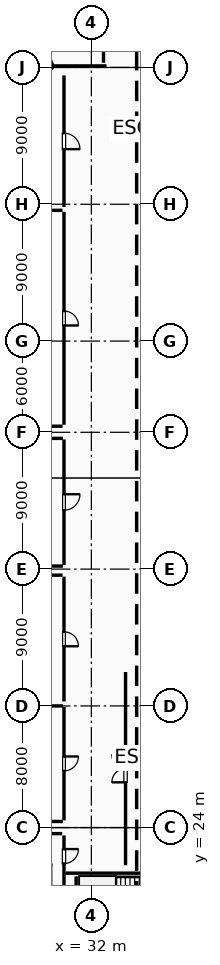
"""IFC4 building model, lengths in metres.
Left out: names, types, materials, properties, quantities, classifications, styles, units other than length and angle.
Written with IfcOpenShell. Run it as: python <this file> out.ifc"""

import sys

from ifc_helpers import new_model, si_unit, direction, frame, frame_2d, origin, origin_2d, place, context, subcontext, project, spatial, rectangle, extrude, element, fill, save


model = new_model("IFC4")
c1 = context("Model", 3, precision=1e-05, world=origin(), true_north=direction((0.0, 1.0)))
c2 = subcontext(c1, "Body", "Model", "MODEL_VIEW")
j1 = project(units=[si_unit("LENGTHUNIT", "METRE"), si_unit("PLANEANGLEUNIT", "RADIAN")], contexts=[c1])
p1 = place(None, origin())
s1 = spatial("IfcSite", under=j1, at=p1, CompositionType="ELEMENT")
p2 = place(p1, origin())
s2 = spatial("IfcBuilding", under=s1, at=p2, CompositionType="ELEMENT")
p3 = place(p2, origin())
s3 = spatial("IfcBuildingStorey", under=s2, at=p3, CompositionType="ELEMENT", Elevation=0.0)
for number, where, z_axis, x_axis in (
    (1, (32.0, 24.0, 0.0), (0.0, 0.0, 1.0), (1.0, 0.0, 0.0)),
    (2, (32.0, 50.0, 0.0), (0.0, 0.0, 1.0), (1.0, 0.0, 0.0)),
    (3, (32.0, 56.0, 0.0), (0.0, 0.0, 1.0), (1.0, 0.0, 0.0)),
    (4, (32.0, 65.0, 0.0), (0.0, 0.0, 1.0), (1.0, 0.0, 0.0)),
):
    element("IfcColumn", number, at=place(p3, frame(where, z_axis=z_axis, x_axis=x_axis)), inside=s3, PredefinedType="COLUMN", context=c2, shape_type="SweptSolid", body=[
        extrude(rectangle(XDim=0.75, YDim=0.75, at=origin_2d()), origin(), (0.0, 0.0, 1.0), 5.4),
    ])
p4 = place(p3, frame((39.2, 21.0, 0.0), z_axis=(0.0, 0.0, 1.0), x_axis=(-1.0, 0.0, 0.0)))
e5 = element("IfcWall", 5, at=p4, inside=s3, PredefinedType="SHEAR", context=c2, shape_type="SweptSolid", body=[
    extrude(rectangle(XDim=8.896, YDim=0.4, at=frame_2d((4.448, 0.0))), origin(), (0.0, 0.0, 1.0), 5.12),
])
p5 = place(p3, frame((31.0, 20.79, 0.0), z_axis=(0.0, 0.0, 1.0), x_axis=(0.0, -1.0, 0.0)))
e6 = element("IfcWall", 6, at=p5, inside=s3, PredefinedType="SHEAR", context=c2, shape_type="SweptSolid", body=[
    extrude(rectangle(XDim=8.38, YDim=0.4, at=frame_2d((4.19, 0.0))), origin(), (0.0, 0.0, 1.0), 5.12),
])
p6 = place(p3, frame((29.45, 21.525, 0.0), z_axis=(0.0, 0.0, 1.0), x_axis=(-1.0, 0.0, 0.0)))
e7 = element("IfcWall", 7, at=p6, inside=s3, PredefinedType="STANDARD", context=c2, shape_type="SweptSolid", body=[
    extrude(rectangle(XDim=3.7, YDim=0.25, at=frame_2d((1.85, 0.0))), origin(), (0.0, 0.0, 1.0), 5.11),
])
p7 = place(p3, frame((29.325, 17.01, 0.0), z_axis=(0.0, 0.0, 1.0), x_axis=(0.0, 1.0, 0.0)))
e8 = element("IfcWall", 8, at=p7, inside=s3, PredefinedType="STANDARD", context=c2, shape_type="SweptSolid", body=[
    extrude(rectangle(XDim=4.38, YDim=0.25, at=frame_2d((2.19, 0.0))), origin(), (0.0, 0.0, 1.0), 5.11),
])
p8 = place(p3, frame((24.374, 74.1, 0.0), z_axis=(0.0, 0.0, 1.0), x_axis=(1.0, 0.0, 0.0)))
e9 = element("IfcWall", 9, at=p8, inside=s3, PredefinedType="SHEAR", context=c2, shape_type="SweptSolid", body=[
    extrude(rectangle(XDim=8.626, YDim=0.4, at=frame_2d((4.313, 0.0))), origin(), (0.0, 0.0, 1.0), 5.12),
])
p9 = place(p8, frame((3.776, 0.0, 0.0)))
e10 = element("IfcOpeningElement", 10, at=p9, cuts=e9, PredefinedType="OPENING", context=c2, shape_type="SweptSolid", body=[
    extrude(rectangle(XDim=1.3, YDim=2.15, at=frame_2d((0.65, 1.075))), frame((0.0, 0.21, 0.0), z_axis=(0.0, -1.0, 0.0), x_axis=(1.0, 0.0, 0.0)), (0.0, 0.0, 1.0), 0.42),
])
p10 = place(p3, frame((32.8, 74.31, 0.0), z_axis=(0.0, 0.0, 1.0), x_axis=(0.0, 1.0, 0.0)))
e11 = element("IfcWall", 11, at=p10, inside=s3, PredefinedType="SHEAR", context=c2, shape_type="SweptSolid", body=[
    extrude(rectangle(XDim=8.38, YDim=0.4, at=frame_2d((4.19, 0.0))), origin(), (0.0, 0.0, 1.0), 5.12),
])
p11 = place(p3, frame((24.39, 64.6, 0.0), z_axis=(0.0, 0.0, 1.0), x_axis=(1.0, 0.0, 0.0)))
e12 = element("IfcWall", 12, at=p11, inside=s3, PredefinedType="PARTITIONING", context=c2, shape_type="SweptSolid", body=[
    extrude(rectangle(XDim=5.715, YDim=0.15, at=frame_2d((2.857, 0.0))), origin(), (0.0, 0.0, 1.0), 4.35),
])
p12 = place(p3, frame((30.2, 64.505, 0.0), z_axis=(0.0, 0.0, 1.0), x_axis=(0.0, -1.0, 0.0)))
e13 = element("IfcWall", 13, at=p12, inside=s3, PredefinedType="PARTITIONING", context=c2, shape_type="SweptSolid", body=[
    extrude(rectangle(XDim=14.01, YDim=0.15, at=frame_2d((7.005, 0.0))), origin(), (0.0, 0.0, 1.0), 5.11),
])
p13 = place(p12, frame((6.53, 0.0, 0.0)))
e14 = element("IfcOpeningElement", 14, at=p13, cuts=e13, PredefinedType="OPENING", context=c2, shape_type="SweptSolid", body=[
    extrude(rectangle(XDim=0.95, YDim=2.15, at=frame_2d((0.475, 1.075))), frame((0.0, 0.085, 0.0), z_axis=(0.0, -1.0, 0.0), x_axis=(1.0, 0.0, 0.0)), (0.0, 0.0, 1.0), 0.17),
])
p14 = place(p3, frame((30.105, 50.4, 0.0), z_axis=(0.0, 0.0, 1.0), x_axis=(-1.0, 0.0, 0.0)))
e15 = element("IfcWall", 15, at=p14, inside=s3, PredefinedType="PARTITIONING", context=c2, shape_type="SweptSolid", body=[
    extrude(rectangle(XDim=5.715, YDim=0.15, at=frame_2d((2.857, 0.0))), origin(), (0.0, 0.0, 1.0), 4.1),
])
p15 = place(p3, frame((24.39, 23.6, 0.0), z_axis=(0.0, 0.0, 1.0), x_axis=(1.0, 0.0, 0.0)))
e16 = element("IfcWall", 16, at=p15, inside=s3, PredefinedType="PARTITIONING", context=c2, shape_type="SweptSolid", body=[
    extrude(rectangle(XDim=5.69, YDim=0.2, at=frame_2d((2.845, 0.0))), origin(), (0.0, 0.0, 1.0), 5.11),
])
p16 = place(p3, frame((30.2, 23.48, 0.0), z_axis=(0.0, 0.0, 1.0), x_axis=(0.0, -1.0, 0.0)))
e17 = element("IfcWall", 17, at=p16, inside=s3, PredefinedType="PARTITIONING", context=c2, shape_type="SweptSolid", body=[
    extrude(rectangle(XDim=7.36, YDim=0.2, at=frame_2d((3.68, 0.0))), origin(), (0.0, 0.0, 1.0), 5.11),
])
p17 = place(p16, frame((0.897, 0.0, 0.0)))
e18 = element("IfcOpeningElement", 18, at=p17, cuts=e17, PredefinedType="OPENING", context=c2, shape_type="SweptSolid", body=[
    extrude(rectangle(XDim=0.95, YDim=2.15, at=frame_2d((0.475, 1.075))), frame((0.0, 0.11, 0.0), z_axis=(0.0, -1.0, 0.0), x_axis=(1.0, 0.0, 0.0)), (0.0, 0.0, 1.0), 0.22),
])
p18 = place(p3, frame((30.2, 73.48, 0.0), z_axis=(0.0, 0.0, 1.0), x_axis=(0.0, -1.0, 0.0)))
e19 = element("IfcWall", 19, at=p18, inside=s3, PredefinedType="PARTITIONING", context=c2, shape_type="SweptSolid", body=[
    extrude(rectangle(XDim=8.66, YDim=0.2, at=frame_2d((4.33, 0.0))), origin(), (0.0, 0.0, 1.0), 5.11),
])
p19 = place(p18, frame((3.805, 0.0, 0.0)))
e20 = element("IfcOpeningElement", 20, at=p19, cuts=e19, PredefinedType="OPENING", context=c2, shape_type="SweptSolid", body=[
    extrude(rectangle(XDim=1.05, YDim=2.15, at=frame_2d((0.525, 1.075))), frame((0.0, 0.11, 0.0), z_axis=(0.0, -1.0, 0.0), x_axis=(1.0, 0.0, 0.0)), (0.0, 0.0, 1.0), 0.22),
])
p20 = place(p3, frame((30.13, 24.4, 0.0), z_axis=(0.0, 0.0, 1.0), x_axis=(-1.0, 0.0, 0.0)))
e21 = element("IfcWall", 21, at=p20, inside=s3, PredefinedType="PARTITIONING", context=c2, shape_type="SweptSolid", body=[
    extrude(rectangle(XDim=5.74, YDim=0.1, at=frame_2d((2.87, 0.0))), origin(), (0.0, 0.0, 1.0), 5.11),
])
p21 = place(p3, frame((16.465, 32.0, 0.0), z_axis=(0.0, 0.0, 1.0), x_axis=(1.0, 0.0, 0.0)))
e22 = element("IfcWall", 22, at=p21, inside=s3, PredefinedType="PARTITIONING", context=c2, shape_type="SweptSolid", body=[
    extrude(rectangle(XDim=13.665, YDim=0.1, at=frame_2d((6.833, 0.0))), origin(), (0.0, 0.0, 1.0), 4.5),
])
p22 = place(p3, frame((30.2, 31.93, 0.0), z_axis=(0.0, 0.0, 1.0), x_axis=(0.0, -1.0, 0.0)))
e23 = element("IfcWall", 23, at=p22, inside=s3, PredefinedType="PARTITIONING", context=c2, shape_type="SweptSolid", body=[
    extrude(rectangle(XDim=7.46, YDim=0.1, at=frame_2d((3.73, 0.0))), origin(), (0.0, 0.0, 1.0), 5.11),
])
p23 = place(p22, frame((3.255, 0.0, 0.0)))
e24 = element("IfcOpeningElement", 24, at=p23, cuts=e23, PredefinedType="OPENING", context=c2, shape_type="SweptSolid", body=[
    extrude(rectangle(XDim=0.95, YDim=2.15, at=frame_2d((0.475, 1.075))), frame((0.0, 0.06, 0.0), z_axis=(0.0, -1.0, 0.0), x_axis=(1.0, 0.0, 0.0)), (0.0, 0.0, 1.0), 0.12),
])
p24 = place(p3, frame((16.465, 40.6, 0.0), z_axis=(0.0, 0.0, 1.0), x_axis=(1.0, 0.0, 0.0)))
e25 = element("IfcWall", 25, at=p24, inside=s3, PredefinedType="PARTITIONING", context=c2, shape_type="SweptSolid", body=[
    extrude(rectangle(XDim=13.64, YDim=0.15, at=frame_2d((6.82, 0.0))), origin(), (0.0, 0.0, 1.0), 5.11),
])
p25 = place(p3, frame((30.2, 40.505, 0.0), z_axis=(0.0, 0.0, 1.0), x_axis=(0.0, -1.0, 0.0)))
e26 = element("IfcWall", 26, at=p25, inside=s3, PredefinedType="PARTITIONING", context=c2, shape_type="SweptSolid", body=[
    extrude(rectangle(XDim=8.21, YDim=0.15, at=frame_2d((4.105, 0.0))), origin(), (0.0, 0.0, 1.0), 5.11),
])
p26 = place(p25, frame((3.63, 0.0, 0.0)))
e27 = element("IfcOpeningElement", 27, at=p26, cuts=e26, PredefinedType="OPENING", context=c2, shape_type="SweptSolid", body=[
    extrude(rectangle(XDim=0.95, YDim=2.15, at=frame_2d((0.475, 1.075))), frame((0.0, 0.085, 0.0), z_axis=(0.0, -1.0, 0.0), x_axis=(1.0, 0.0, 0.0)), (0.0, 0.0, 1.0), 0.17),
])
p27 = place(p3, frame((24.39, 49.6, 0.0), z_axis=(0.0, 0.0, 1.0), x_axis=(1.0, 0.0, 0.0)))
e28 = element("IfcWall", 28, at=p27, inside=s3, PredefinedType="PARTITIONING", context=c2, shape_type="SweptSolid", body=[
    extrude(rectangle(XDim=5.74, YDim=0.1, at=frame_2d((2.87, 0.0))), origin(), (0.0, 0.0, 1.0), 4.1),
])
p28 = place(p3, frame((30.2, 49.53, 0.0), z_axis=(0.0, 0.0, 1.0), x_axis=(0.0, -1.0, 0.0)))
e29 = element("IfcWall", 29, at=p28, inside=s3, PredefinedType="PARTITIONING", context=c2, shape_type="SweptSolid", body=[
    extrude(rectangle(XDim=8.26, YDim=0.1, at=frame_2d((4.13, 0.0))), origin(), (0.0, 0.0, 1.0), 5.11),
])
p29 = place(p28, frame((3.605, 0.0, 0.0)))
e30 = element("IfcOpeningElement", 30, at=p29, cuts=e29, PredefinedType="OPENING", context=c2, shape_type="SweptSolid", body=[
    extrude(rectangle(XDim=1.05, YDim=2.15, at=frame_2d((0.525, 1.075))), frame((0.0, 0.06, 0.0), z_axis=(0.0, -1.0, 0.0), x_axis=(1.0, 0.0, 0.0)), (0.0, 0.0, 1.0), 0.12),
])
p30 = place(p3, frame((30.13, 41.2, 0.0), z_axis=(0.0, 0.0, 1.0), x_axis=(-1.0, 0.0, 0.0)))
e31 = element("IfcWall", 31, at=p30, inside=s3, PredefinedType="PARTITIONING", context=c2, shape_type="SweptSolid", body=[
    extrude(rectangle(XDim=13.66, YDim=0.1, at=frame_2d((6.83, 0.0))), origin(), (0.0, 0.0, 1.0), 4.5),
])
p31 = place(p3, frame((34.25, 21.52, 0.0), z_axis=(0.0, 0.0, 1.0), x_axis=(0.0, 1.0, 0.0)))
e32 = element("IfcWall", 32, at=p31, inside=s3, PredefinedType="PARTITIONING", context=c2, shape_type="SweptSolid", body=[
    extrude(rectangle(XDim=12.71, YDim=0.2, at=frame_2d((6.355, 0.0))), origin(), (0.0, 0.0, 1.0), 5.11),
])
p32 = place(p31, frame((5.455, 0.0, 0.0)))
e33 = element("IfcOpeningElement", 33, at=p32, cuts=e32, PredefinedType="OPENING", context=c2, shape_type="SweptSolid", body=[
    extrude(rectangle(XDim=1.8, YDim=2.15, at=frame_2d((0.9, 1.075))), frame((0.0, 0.11, 0.0), z_axis=(0.0, -1.0, 0.0), x_axis=(1.0, 0.0, 0.0)), (0.0, 0.0, 1.0), 0.22),
])
p33 = place(p9, origin())
e34 = element("IfcDoor", 34, at=p33, inside=s3, OperationType="SINGLE_SWING_LEFT", PredefinedType="DOOR", context=c2, shape_type="SweptSolid", body=[
    extrude(rectangle(XDim=1.3, YDim=2.15, at=frame_2d((0.65, 1.075))), frame((0.0, 0.025, 0.0), z_axis=(0.0, -1.0, 0.0), x_axis=(1.0, 0.0, 0.0)), (0.0, 0.0, 1.0), 0.05),
])
fill(e10, e34)
p34 = place(p13, origin())
e35 = element("IfcDoor", 35, at=p34, inside=s3, OperationType="SINGLE_SWING_RIGHT", PredefinedType="DOOR", context=c2, shape_type="SweptSolid", body=[
    extrude(rectangle(XDim=0.95, YDim=2.15, at=frame_2d((0.475, 1.075))), frame((0.0, 0.025, 0.0), z_axis=(0.0, -1.0, 0.0), x_axis=(1.0, 0.0, 0.0)), (0.0, 0.0, 1.0), 0.05),
])
fill(e14, e35)
p35 = place(p17, origin())
e36 = element("IfcDoor", 36, at=p35, inside=s3, OperationType="SINGLE_SWING_LEFT", PredefinedType="DOOR", context=c2, shape_type="SweptSolid", body=[
    extrude(rectangle(XDim=0.95, YDim=2.15, at=frame_2d((0.475, 1.075))), frame((0.0, 0.025, 0.0), z_axis=(0.0, -1.0, 0.0), x_axis=(1.0, 0.0, 0.0)), (0.0, 0.0, 1.0), 0.05),
])
fill(e18, e36)
p36 = place(p19, origin())
e37 = element("IfcDoor", 37, at=p36, inside=s3, OperationType="SINGLE_SWING_RIGHT", PredefinedType="DOOR", context=c2, shape_type="SweptSolid", body=[
    extrude(rectangle(XDim=1.05, YDim=2.15, at=frame_2d((0.525, 1.075))), frame((0.0, 0.025, 0.0), z_axis=(0.0, -1.0, 0.0), x_axis=(1.0, 0.0, 0.0)), (0.0, 0.0, 1.0), 0.05),
])
fill(e20, e37)
p37 = place(p23, origin())
e38 = element("IfcDoor", 38, at=p37, inside=s3, OperationType="SINGLE_SWING_LEFT", PredefinedType="DOOR", context=c2, shape_type="SweptSolid", body=[
    extrude(rectangle(XDim=0.95, YDim=2.15, at=frame_2d((0.475, 1.075))), frame((0.0, 0.025, 0.0), z_axis=(0.0, -1.0, 0.0), x_axis=(1.0, 0.0, 0.0)), (0.0, 0.0, 1.0), 0.05),
])
fill(e24, e38)
p38 = place(p26, origin())
e39 = element("IfcDoor", 39, at=p38, inside=s3, OperationType="SINGLE_SWING_RIGHT", PredefinedType="DOOR", context=c2, shape_type="SweptSolid", body=[
    extrude(rectangle(XDim=0.95, YDim=2.15, at=frame_2d((0.475, 1.075))), frame((0.0, 0.025, 0.0), z_axis=(0.0, -1.0, 0.0), x_axis=(1.0, 0.0, 0.0)), (0.0, 0.0, 1.0), 0.05),
])
fill(e27, e39)
p39 = place(p29, origin())
e40 = element("IfcDoor", 40, at=p39, inside=s3, OperationType="SINGLE_SWING_LEFT", PredefinedType="DOOR", context=c2, shape_type="SweptSolid", body=[
    extrude(rectangle(XDim=1.05, YDim=2.15, at=frame_2d((0.525, 1.075))), frame((0.0, 0.025, 0.0), z_axis=(0.0, -1.0, 0.0), x_axis=(1.0, 0.0, 0.0)), (0.0, 0.0, 1.0), 0.05),
])
fill(e30, e40)
p40 = place(p32, origin())
e41 = element("IfcDoor", 41, at=p40, inside=s3, OperationType="DOUBLE_DOOR_SINGLE_SWING", PredefinedType="DOOR", context=c2, shape_type="SweptSolid", body=[
    extrude(rectangle(XDim=1.8, YDim=2.15, at=frame_2d((0.9, 1.075))), frame((0.0, 0.025, 0.0), z_axis=(0.0, -1.0, 0.0), x_axis=(1.0, 0.0, 0.0)), (0.0, 0.0, 1.0), 0.05),
])
fill(e33, e41)
save(model, sys.argv[1])
